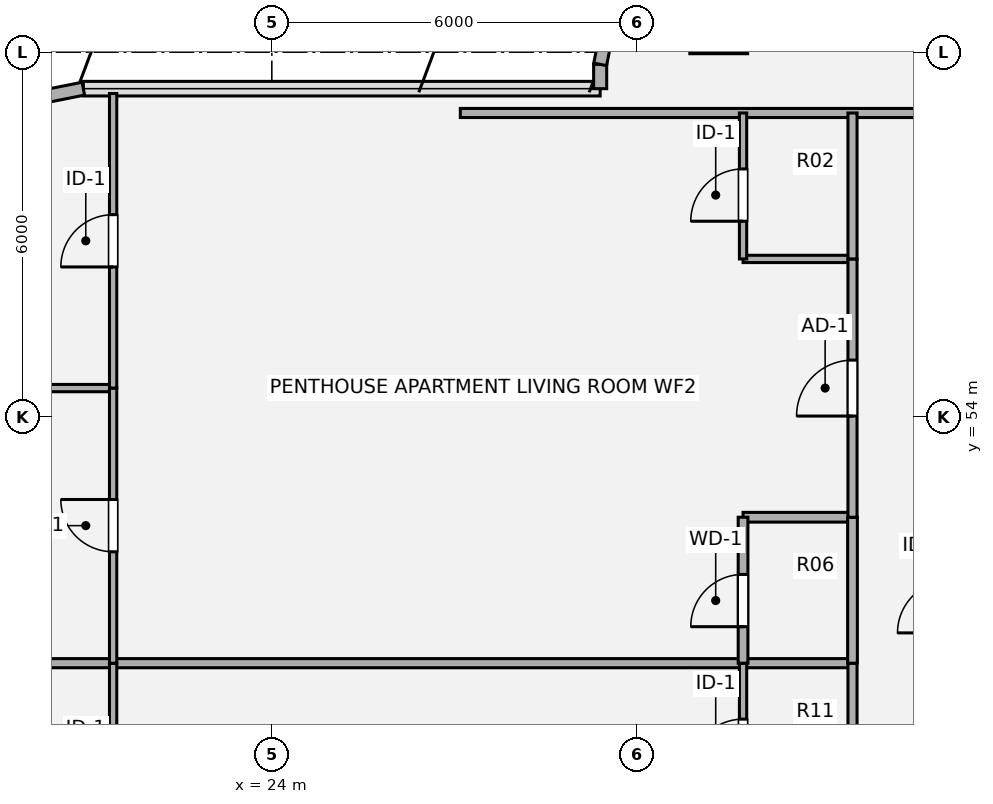
"""IFC4 building model, lengths in metres.
Left out: names, types, materials, properties, quantities, classifications, styles, units other than length and angle.
Written with IfcOpenShell. Run it as: python <this file> out.ifc"""

import sys

from ifc_helpers import new_model, si_unit, direction, frame, frame_2d, origin, origin_2d, place, context, subcontext, project, spatial, rectangle, extrude, source, transform, mapped, element, fill, save


model = new_model("IFC4")
c1 = context("Model", 3, precision=1e-05, world=origin(), true_north=direction((0.0, 1.0)))
c2 = subcontext(c1, "Body", "Model", "MODEL_VIEW")
j1 = project(units=[si_unit("LENGTHUNIT", "METRE"), si_unit("PLANEANGLEUNIT", "RADIAN")], contexts=[c1])
p1 = place(None, origin())
s1 = spatial("IfcSite", under=j1, at=p1, CompositionType="ELEMENT")
p2 = place(p1, origin())
s2 = spatial("IfcBuilding", under=s1, at=p2, CompositionType="ELEMENT")
p3 = place(p2, frame((0.0, 0.0, 230.58)))
s3 = spatial("IfcBuildingStorey", under=s2, at=p3, CompositionType="ELEMENT", Elevation=230.58)
p4 = place(p3, frame((19.675, 59.156, 0.0), z_axis=(0.0, 0.0, 1.0), x_axis=(0.980813122964, 0.194950295773, 0.0)))
e1 = element("IfcWall", 1, at=p4, inside=s3, PredefinedType="SOLIDWALL", context=c2, shape_type="SweptSolid", body=[
    extrude(rectangle(XDim=1.249, YDim=0.215, at=frame_2d((0.624, 0.0))), origin(), (0.0, 0.0, 1.0), 3.53),
])
p5 = place(p3, frame((29.4, 59.4, 0.0), z_axis=(0.0, 0.0, 1.0), x_axis=(0.0, 1.0, 0.0)))
e2 = element("IfcWall", 2, at=p5, inside=s3, PredefinedType="SOLIDWALL", context=c2, shape_type="SweptSolid", body=[
    extrude(rectangle(XDim=0.4, YDim=0.215, at=frame_2d((0.2, 0.0))), origin(), (0.0, 0.0, 1.0), 3.53),
])
p6 = place(p3, frame((29.4, 59.8, 0.0), z_axis=(0.0, 0.0, 1.0), x_axis=(0.195190360752, 0.980765376158, 0.0)))
e3 = element("IfcWall", 3, at=p6, inside=s3, PredefinedType="SOLIDWALL", context=c2, shape_type="SweptSolid", body=[
    extrude(rectangle(XDim=1.014, YDim=0.215, at=frame_2d((0.507, 0.0))), origin(), (0.0, 0.0, 1.0), 3.53),
])
p7 = place(p3, frame((17.78, 49.952, 0.0), z_axis=(0.0, 0.0, 1.0), x_axis=(1.0, 0.0, 0.0)))
e4 = element("IfcWall", 4, at=p7, inside=s3, PredefinedType="PARTITIONING", context=c2, shape_type="SweptSolid", body=[
    extrude(rectangle(XDim=15.77, YDim=0.15, at=frame_2d((7.885, 0.0))), origin(), (0.0, 0.0, 1.0), 2.982),
])
p8 = place(p3, frame((31.75, 52.352, 0.0), z_axis=(0.0, 0.0, 1.0), x_axis=(1.0, 0.0, 0.0)))
e5 = element("IfcWall", 5, at=p8, inside=s3, PredefinedType="PLUMBINGWALL", context=c2, shape_type="SweptSolid", body=[
    extrude(rectangle(XDim=1.8, YDim=0.16, at=frame_2d((0.9, 0.0))), origin(), (0.0, 0.0, 1.0), 3.259),
])
p9 = place(p3, frame((17.78, 54.476, 0.0), z_axis=(0.0, 0.0, 1.0), x_axis=(1.0, 0.0, 0.0)))
e6 = element("IfcWall", 6, at=p9, inside=s3, PredefinedType="PARTITIONING", context=c2, shape_type="SweptSolid", body=[
    extrude(rectangle(XDim=3.61, YDim=0.12, at=frame_2d((1.805, 0.0))), origin(), (0.0, 0.0, 1.0), 2.903),
])
p10 = place(p3, frame((31.75, 56.6, 0.0), z_axis=(0.0, 0.0, 1.0), x_axis=(1.0, 0.0, 0.0)))
e7 = element("IfcWall", 7, at=p10, inside=s3, PredefinedType="PARTITIONING", context=c2, shape_type="SweptSolid", body=[
    extrude(rectangle(XDim=1.8, YDim=0.12, at=frame_2d((0.9, 0.0))), origin(), (0.0, 0.0, 1.0), 3.259),
])
p11 = place(p3, frame((27.1, 59.0, 0.0), z_axis=(0.0, 0.0, 1.0), x_axis=(1.0, 0.0, 0.0)))
e8 = element("IfcWall", 8, at=p11, inside=s3, PredefinedType="PARTITIONING", context=c2, shape_type="SweptSolid", body=[
    extrude(rectangle(XDim=17.8, YDim=0.15, at=frame_2d((8.9, 0.0))), origin(), (0.0, 0.0, 1.0), 3.308),
])
p12 = place(p11, frame((8.375, 0.0, 0.0)))
e9 = element("IfcOpeningElement", 9, at=p12, cuts=e8, PredefinedType="OPENING", context=c2, shape_type="SweptSolid", body=[
    extrude(rectangle(XDim=1.05, YDim=2.1, at=origin_2d()), frame((0.525, 0.085, 1.05), z_axis=(0.0, -1.0, 0.0), x_axis=(1.0, 0.0, 0.0)), (0.0, 0.0, 1.0), 0.17),
])
p13 = place(p3, frame((21.39, 45.776, 0.0), z_axis=(0.0, 0.0, 1.0), x_axis=(0.0, 1.0, 0.0)))
e10 = element("IfcWall", 10, at=p13, inside=s3, PredefinedType="PARTITIONING", context=c2, shape_type="SweptSolid", body=[
    extrude(rectangle(XDim=4.176, YDim=0.12, at=frame_2d((2.088, 0.0))), origin(), (0.0, 0.0, 1.0), 3.5),
])
p14 = place(p13, frame((1.658, 0.0, 0.0)))
e11 = element("IfcOpeningElement", 11, at=p14, cuts=e10, PredefinedType="OPENING", context=c2, shape_type="SweptSolid", body=[
    extrude(rectangle(XDim=0.86, YDim=2.1, at=origin_2d()), frame((0.43, 0.07, 1.05), z_axis=(0.0, -1.0, 0.0), x_axis=(1.0, 0.0, 0.0)), (0.0, 0.0, 1.0), 0.14),
])
p15 = place(p3, frame((21.39, 49.952, 0.0), z_axis=(0.0, 0.0, 1.0), x_axis=(0.0, 1.0, 0.0)))
e12 = element("IfcWall", 12, at=p15, inside=s3, PredefinedType="PARTITIONING", context=c2, shape_type="SweptSolid", body=[
    extrude(rectangle(XDim=4.524, YDim=0.12, at=frame_2d((2.262, 0.0))), origin(), (0.0, 0.0, 1.0), 3.5),
])
p16 = place(p15, frame((1.832, 0.0, 0.0)))
e13 = element("IfcOpeningElement", 13, at=p16, cuts=e12, PredefinedType="OPENING", context=c2, shape_type="SweptSolid", body=[
    extrude(rectangle(XDim=0.86, YDim=2.1, at=origin_2d()), frame((0.43, 0.07, 1.05), z_axis=(0.0, -1.0, 0.0), x_axis=(1.0, 0.0, 0.0)), (0.0, 0.0, 1.0), 0.14),
])
p17 = place(p3, frame((21.39, 54.476, 0.0), z_axis=(0.0, 0.0, 1.0), x_axis=(0.0, 1.0, 0.0)))
e14 = element("IfcWall", 14, at=p17, inside=s3, PredefinedType="PARTITIONING", context=c2, shape_type="SweptSolid", body=[
    extrude(rectangle(XDim=4.844, YDim=0.12, at=frame_2d((2.422, 0.0))), origin(), (0.0, 0.0, 1.0), 3.5),
])
p18 = place(p17, frame((1.992, 0.0, 0.0)))
e15 = element("IfcOpeningElement", 15, at=p18, cuts=e14, PredefinedType="OPENING", context=c2, shape_type="SweptSolid", body=[
    extrude(rectangle(XDim=0.86, YDim=2.1, at=origin_2d()), frame((0.43, 0.07, 1.05), z_axis=(0.0, -1.0, 0.0), x_axis=(1.0, 0.0, 0.0)), (0.0, 0.0, 1.0), 0.14),
])
p19 = place(p3, frame((31.75, 47.552, 0.0), z_axis=(0.0, 0.0, 1.0), x_axis=(0.0, 1.0, 0.0)))
e16 = element("IfcWall", 16, at=p19, inside=s3, PredefinedType="PARTITIONING", context=c2, shape_type="SweptSolid", body=[
    extrude(rectangle(XDim=2.4, YDim=0.12, at=frame_2d((1.2, 0.0))), origin(), (0.0, 0.0, 1.0), 3.5),
])
p20 = place(p19, frame((0.62, 0.0, 0.0)))
e17 = element("IfcOpeningElement", 17, at=p20, cuts=e16, PredefinedType="OPENING", context=c2, shape_type="SweptSolid", body=[
    extrude(rectangle(XDim=0.86, YDim=2.1, at=origin_2d()), frame((0.43, 0.07, 1.05), z_axis=(0.0, -1.0, 0.0), x_axis=(1.0, 0.0, 0.0)), (0.0, 0.0, 1.0), 0.14),
])
p21 = place(p3, frame((31.75, 49.952, 0.0), z_axis=(0.0, 0.0, 1.0), x_axis=(0.0, 1.0, 0.0)))
e18 = element("IfcWall", 18, at=p21, inside=s3, PredefinedType="PLUMBINGWALL", context=c2, shape_type="SweptSolid", body=[
    extrude(rectangle(XDim=2.4, YDim=0.16, at=frame_2d((1.2, 0.0))), origin(), (0.0, 0.0, 1.0), 3.5),
])
p22 = place(p21, frame((0.6, 0.0, 0.0)))
e19 = element("IfcOpeningElement", 19, at=p22, cuts=e18, PredefinedType="OPENING", context=c2, shape_type="SweptSolid", body=[
    extrude(rectangle(XDim=0.86, YDim=2.1, at=origin_2d()), frame((0.43, 0.09, 1.05), z_axis=(0.0, -1.0, 0.0), x_axis=(1.0, 0.0, 0.0)), (0.0, 0.0, 1.0), 0.18),
])
p23 = place(p3, frame((31.75, 56.6, 0.0), z_axis=(0.0, 0.0, 1.0), x_axis=(0.0, 1.0, 0.0)))
e20 = element("IfcWall", 20, at=p23, inside=s3, PredefinedType="PARTITIONING", context=c2, shape_type="SweptSolid", body=[
    extrude(rectangle(XDim=2.4, YDim=0.12, at=frame_2d((1.2, 0.0))), origin(), (0.0, 0.0, 1.0), 3.5),
])
p24 = place(p23, frame((0.62, 0.0, 0.0)))
e21 = element("IfcOpeningElement", 21, at=p24, cuts=e20, PredefinedType="OPENING", context=c2, shape_type="SweptSolid", body=[
    extrude(rectangle(XDim=0.86, YDim=2.1, at=origin_2d()), frame((0.43, 0.07, 1.05), z_axis=(0.0, -1.0, 0.0), x_axis=(1.0, 0.0, 0.0)), (0.0, 0.0, 1.0), 0.14),
])
p25 = place(p3, frame((33.55, 47.552, 0.0), z_axis=(0.0, 0.0, 1.0), x_axis=(0.0, 1.0, 0.0)))
e22 = element("IfcWall", 22, at=p25, inside=s3, PredefinedType="PARTITIONING", context=c2, shape_type="SweptSolid", body=[
    extrude(rectangle(XDim=2.4, YDim=0.15, at=frame_2d((1.2, 0.0))), origin(), (0.0, 0.0, 1.0), 3.5),
])
p26 = place(p3, frame((33.55, 49.952, 0.0), z_axis=(0.0, 0.0, 1.0), x_axis=(0.0, 1.0, 0.0)))
e23 = element("IfcWall", 23, at=p26, inside=s3, PredefinedType="PLUMBINGWALL", context=c2, shape_type="SweptSolid", body=[
    extrude(rectangle(XDim=2.4, YDim=0.16, at=frame_2d((1.2, 0.0))), origin(), (0.0, 0.0, 1.0), 3.5),
])
p27 = place(p3, frame((33.55, 52.352, 0.0), z_axis=(0.0, 0.0, 1.0), x_axis=(0.0, 1.0, 0.0)))
e24 = element("IfcWall", 24, at=p27, inside=s3, PredefinedType="PARTITIONING", context=c2, shape_type="SweptSolid", body=[
    extrude(rectangle(XDim=4.248, YDim=0.15, at=frame_2d((2.124, 0.0))), origin(), (0.0, 0.0, 1.0), 3.5),
])
p28 = place(p27, frame((1.664, 0.0, 0.0)))
e25 = element("IfcOpeningElement", 25, at=p28, cuts=e24, PredefinedType="OPENING", context=c2, shape_type="SweptSolid", body=[
    extrude(rectangle(XDim=0.92, YDim=2.1, at=origin_2d()), frame((0.46, 0.085, 1.05), z_axis=(0.0, -1.0, 0.0), x_axis=(1.0, 0.0, 0.0)), (0.0, 0.0, 1.0), 0.17),
])
p29 = place(p3, frame((33.55, 56.6, 0.0), z_axis=(0.0, 0.0, 1.0), x_axis=(0.0, 1.0, 0.0)))
e26 = element("IfcWall", 26, at=p29, inside=s3, PredefinedType="PARTITIONING", context=c2, shape_type="SweptSolid", body=[
    extrude(rectangle(XDim=2.4, YDim=0.15, at=frame_2d((1.2, 0.0))), origin(), (0.0, 0.0, 1.0), 3.5),
])
m1 = source(origin(), c2, "Body", "SweptSolid", [
    extrude(rectangle(XDim=0.86, YDim=2.1, at=origin_2d()), frame((0.43, 0.025, 1.05), z_axis=(0.0, -1.0, 0.0), x_axis=(1.0, 0.0, 0.0)), (0.0, 0.0, 1.0), 0.05),
])
p30 = place(p16, origin())
e27 = element("IfcDoor", 27, at=p30, inside=s3, OperationType="SINGLE_SWING_RIGHT", PredefinedType="DOOR", context=c2, shape_type="MappedRepresentation", body=[
    mapped(m1, transform((0.0, 0.0, 0.0), x_axis=(1.0, 0.0, 0.0), y_axis=(0.0, 1.0, 0.0), z_axis=(0.0, 0.0, 1.0), scale=1.0)),
])
fill(e13, e27)
p31 = place(p18, origin())
e28 = element("IfcDoor", 28, at=p31, inside=s3, OperationType="SINGLE_SWING_LEFT", PredefinedType="DOOR", context=c2, shape_type="MappedRepresentation", body=[
    mapped(m1, transform((0.0, 0.0, 0.0), x_axis=(1.0, 0.0, 0.0), y_axis=(0.0, 1.0, 0.0), z_axis=(0.0, 0.0, 1.0), scale=1.0)),
])
fill(e15, e28)
p32 = place(p20, origin())
e29 = element("IfcDoor", 29, at=p32, inside=s3, OperationType="SINGLE_SWING_LEFT", PredefinedType="DOOR", context=c2, shape_type="MappedRepresentation", body=[
    mapped(m1, transform((0.0, 0.0, 0.0), x_axis=(1.0, 0.0, 0.0), y_axis=(0.0, 1.0, 0.0), z_axis=(0.0, 0.0, 1.0), scale=1.0)),
])
fill(e17, e29)
m2 = source(origin(), c2, "Body", "SweptSolid", [
    extrude(rectangle(XDim=0.86, YDim=2.1, at=origin_2d()), frame((0.43, 0.025, 1.05), z_axis=(0.0, -1.0, 0.0), x_axis=(1.0, 0.0, 0.0)), (0.0, 0.0, 1.0), 0.05),
])
p33 = place(p22, origin())
e30 = element("IfcDoor", 30, at=p33, inside=s3, OperationType="SINGLE_SWING_LEFT", PredefinedType="DOOR", context=c2, shape_type="MappedRepresentation", body=[
    mapped(m2, transform((0.0, 0.0, 0.0), x_axis=(1.0, 0.0, 0.0), y_axis=(0.0, 1.0, 0.0), z_axis=(0.0, 0.0, 1.0), scale=1.0)),
])
fill(e19, e30)
p34 = place(p24, origin())
e31 = element("IfcDoor", 31, at=p34, inside=s3, OperationType="SINGLE_SWING_LEFT", PredefinedType="DOOR", context=c2, shape_type="MappedRepresentation", body=[
    mapped(m1, transform((0.0, 0.0, 0.0), x_axis=(1.0, 0.0, 0.0), y_axis=(0.0, 1.0, 0.0), z_axis=(0.0, 0.0, 1.0), scale=1.0)),
])
fill(e21, e31)
m3 = source(origin(), c2, "Body", "SweptSolid", [
    extrude(rectangle(XDim=0.92, YDim=2.1, at=origin_2d()), frame((0.46, 0.025, 1.05), z_axis=(0.0, -1.0, 0.0), x_axis=(1.0, 0.0, 0.0)), (0.0, 0.0, 1.0), 0.05),
])
p35 = place(p28, origin())
e32 = element("IfcDoor", 32, at=p35, inside=s3, OperationType="SINGLE_SWING_LEFT", PredefinedType="DOOR", context=c2, shape_type="MappedRepresentation", body=[
    mapped(m3, transform((0.0, 0.0, 0.0), x_axis=(1.0, 0.0, 0.0), y_axis=(0.0, 1.0, 0.0), z_axis=(0.0, 0.0, 1.0), scale=1.0)),
])
fill(e25, e32)
save(model, sys.argv[1])
